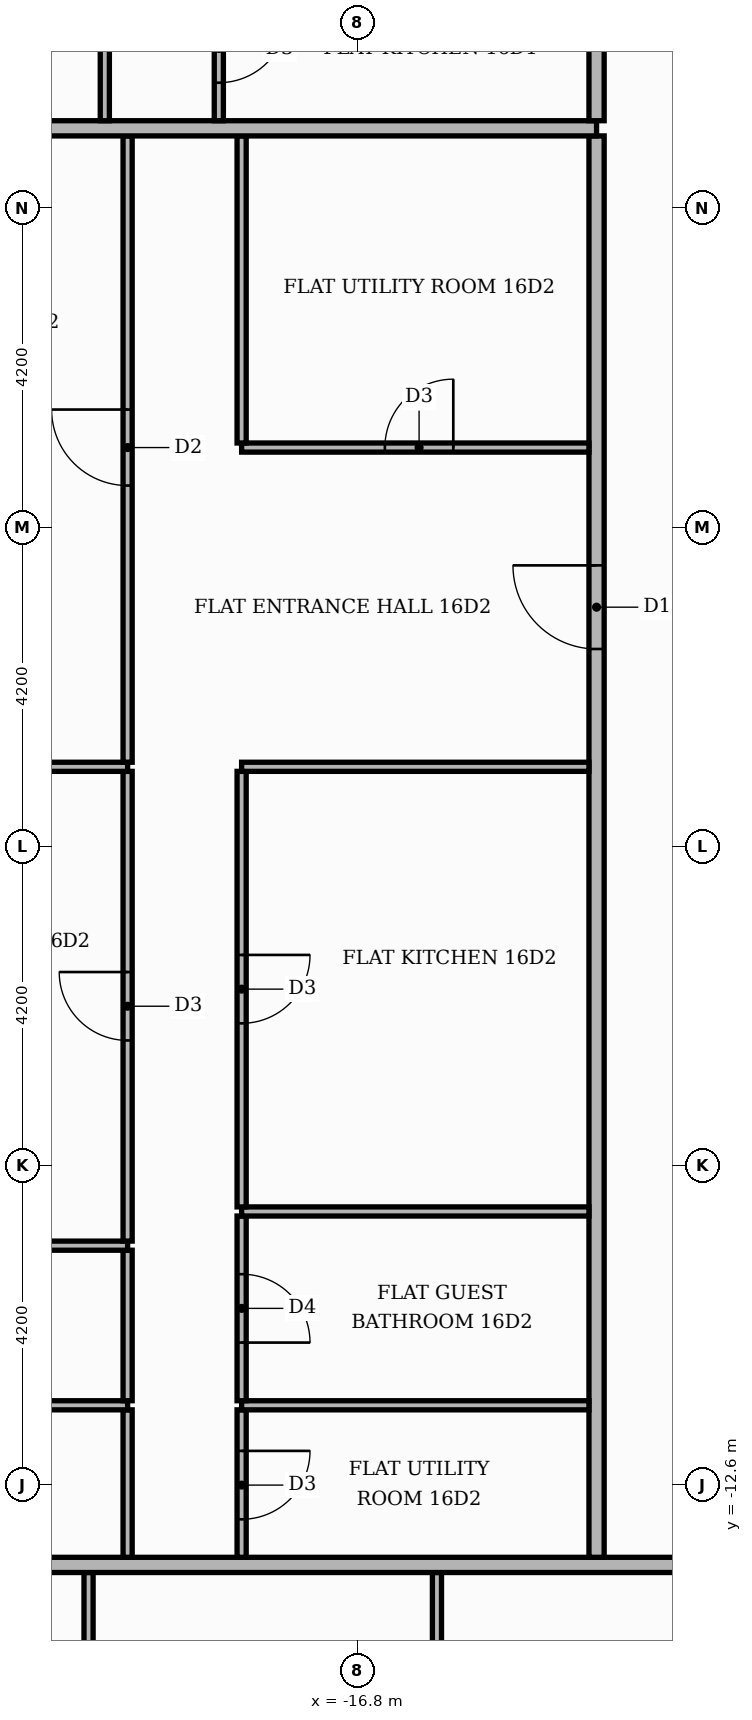
"""IFC4 building model, lengths in metres.
Left out: names, types, materials, properties, quantities, classifications, styles, units other than length and angle.
Written with IfcOpenShell. Run it as: python <this file> out.ifc"""

import sys

from ifc_helpers import new_model, si_unit, direction, frame, frame_2d, origin, place, context, subcontext, project, spatial, rectangle, extrude, element, fill, save


model = new_model("IFC4")
c1 = context("Model", 3, precision=1e-05, world=origin(), true_north=direction((0.0, 1.0)))
c2 = subcontext(c1, "Body", "Model", "MODEL_VIEW")
j1 = project(units=[si_unit("LENGTHUNIT", "METRE"), si_unit("PLANEANGLEUNIT", "RADIAN")], contexts=[c1])
p1 = place(None, origin())
s1 = spatial("IfcSite", under=j1, at=p1, CompositionType="ELEMENT")
p2 = place(p1, origin())
s2 = spatial("IfcBuilding", under=s1, at=p2, CompositionType="ELEMENT")
p3 = place(p2, frame((0.0, 0.0, 69.9)))
s3 = spatial("IfcBuildingStorey", under=s2, at=p3, CompositionType="ELEMENT", Elevation=69.9)
p4 = place(p3, frame((-20.334, -20.66, 0.0), z_axis=(0.0, 0.0, 1.0), x_axis=(0.0, 1.0, 0.0)))
e1 = element("IfcWall", 1, at=p4, inside=s3, PredefinedType="PARTITIONING", context=c2, shape_type="SweptSolid", body=[
    extrude(rectangle(XDim=6.91, YDim=0.12, at=frame_2d((3.455, 0.0))), origin(), (0.0, 0.0, 1.0), 3.4),
])
p5 = place(p4, frame((4.792, 0.0, 0.0)))
e2 = element("IfcOpeningElement", 2, at=p5, cuts=e1, PredefinedType="OPENING", context=c2, shape_type="SweptSolid", body=[
    extrude(rectangle(XDim=0.9, YDim=2.1, at=frame_2d((0.45, 1.05))), frame((0.0, 0.07, 0.0), z_axis=(0.0, -1.0, 0.0), x_axis=(1.0, 0.0, 0.0)), (0.0, 0.0, 1.0), 0.14),
])
p6 = place(p3, frame((-15.75, -20.66, 0.0), z_axis=(0.0, 0.0, 1.0), x_axis=(0.0, 1.0, 0.0)))
e3 = element("IfcWall", 3, at=p6, inside=s3, PredefinedType="PARTITIONING", context=c2, shape_type="SweptSolid", body=[
    extrude(rectangle(XDim=6.91, YDim=0.12, at=frame_2d((3.455, 0.0))), origin(), (0.0, 0.0, 1.0), 3.4),
])
p7 = place(p6, frame((2.975, 0.0, 0.0)))
e4 = element("IfcOpeningElement", 4, at=p7, cuts=e3, PredefinedType="OPENING", context=c2, shape_type="SweptSolid", body=[
    extrude(rectangle(XDim=1.0, YDim=2.1, at=frame_2d((0.5, 1.05))), frame((0.0, 0.07, 0.0), z_axis=(0.0, -1.0, 0.0), x_axis=(1.0, 0.0, 0.0)), (0.0, 0.0, 1.0), 0.14),
])
p8 = place(p3, frame((-25.42, -13.65, 0.0), z_axis=(0.0, 0.0, 1.0), x_axis=(1.0, 0.0, 0.0)))
e5 = element("IfcWall", 5, at=p8, inside=s3, PredefinedType="PARTITIONING", context=c2, shape_type="SweptSolid", body=[
    extrude(rectangle(XDim=39.07, YDim=0.2, at=frame_2d((19.535, 0.0))), origin(), (0.0, 0.0, 1.0), 3.4),
])
p9 = place(p8, frame((13.32, 0.0, 0.0)))
e6 = element("IfcOpeningElement", 6, at=p9, cuts=e5, PredefinedType="OPENING", context=c2, shape_type="SweptSolid", body=[
    extrude(rectangle(XDim=1.1, YDim=2.4, at=frame_2d((0.55, 1.2))), frame((0.0, 0.11, 0.0), z_axis=(0.0, -1.0, 0.0), x_axis=(1.0, 0.0, 0.0)), (0.0, 0.0, 1.0), 0.22),
])
p10 = place(p8, frame((21.72, 0.0, 0.0)))
e7 = element("IfcOpeningElement", 7, at=p10, cuts=e5, PredefinedType="OPENING", context=c2, shape_type="SweptSolid", body=[
    extrude(rectangle(XDim=1.1, YDim=2.4, at=frame_2d((0.55, 1.2))), frame((0.0, 0.11, 0.0), z_axis=(0.0, -1.0, 0.0), x_axis=(1.0, 0.0, 0.0)), (0.0, 0.0, 1.0), 0.22),
])
p11 = place(p3, frame((-19.82, -13.55, 0.0), z_axis=(0.0, 0.0, 1.0), x_axis=(0.0, 1.0, 0.0)))
e8 = element("IfcWall", 8, at=p11, inside=s3, PredefinedType="PARTITIONING", context=c2, shape_type="SweptSolid", body=[
    extrude(rectangle(XDim=1.94, YDim=0.12, at=frame_2d((0.97, 0.0))), origin(), (0.0, 0.0, 1.0), 3.4),
])
p12 = place(p3, frame((-18.32, -13.55, 0.0), z_axis=(0.0, 0.0, 1.0), x_axis=(0.0, 1.0, 0.0)))
e9 = element("IfcWall", 9, at=p12, inside=s3, PredefinedType="PARTITIONING", context=c2, shape_type="SweptSolid", body=[
    extrude(rectangle(XDim=1.94, YDim=0.12, at=frame_2d((0.97, 0.0))), origin(), (0.0, 0.0, 1.0), 3.4),
])
p13 = place(p12, frame((0.5, 0.0, 0.0)))
e10 = element("IfcOpeningElement", 10, at=p13, cuts=e9, PredefinedType="OPENING", context=c2, shape_type="SweptSolid", body=[
    extrude(rectangle(XDim=0.9, YDim=2.1, at=frame_2d((0.45, 1.05))), frame((0.0, 0.07, 0.0), z_axis=(0.0, -1.0, 0.0), x_axis=(1.0, 0.0, 0.0)), (0.0, 0.0, 1.0), 0.14),
])
p14 = place(p3, frame((-13.65, -13.55, 0.0), z_axis=(0.0, 0.0, 1.0), x_axis=(0.0, 1.0, 0.0)))
e11 = element("IfcWall", 11, at=p14, inside=s3, PredefinedType="PARTITIONING", context=c2, shape_type="SweptSolid", body=[
    extrude(rectangle(XDim=18.7, YDim=0.2, at=frame_2d((9.35, 0.0))), origin(), (0.0, 0.0, 1.0), 3.4),
])
p15 = place(p14, frame((11.95, 0.0, 0.0)))
e12 = element("IfcOpeningElement", 12, at=p15, cuts=e11, PredefinedType="OPENING", context=c2, shape_type="SweptSolid", body=[
    extrude(rectangle(XDim=1.1, YDim=2.4, at=frame_2d((0.55, 1.2))), frame((0.0, 0.11, 0.0), z_axis=(0.0, -1.0, 0.0), x_axis=(1.0, 0.0, 0.0)), (0.0, 0.0, 1.0), 0.22),
])
p16 = place(p3, frame((-25.42, -11.55, 0.0), z_axis=(0.0, 0.0, 1.0), x_axis=(1.0, 0.0, 0.0)))
e13 = element("IfcWall", 13, at=p16, inside=s3, PredefinedType="PARTITIONING", context=c2, shape_type="SweptSolid", body=[
    extrude(rectangle(XDim=5.6, YDim=0.12, at=frame_2d((2.8, 0.0))), origin(), (0.0, 0.0, 1.0), 3.4),
])
p17 = place(p16, frame((2.2, 0.0, 0.0)))
e14 = element("IfcOpeningElement", 14, at=p17, cuts=e13, PredefinedType="OPENING", context=c2, shape_type="SweptSolid", body=[
    extrude(rectangle(XDim=0.9, YDim=2.1, at=frame_2d((0.45, 1.05))), frame((0.0, 0.07, 0.0), z_axis=(0.0, -1.0, 0.0), x_axis=(1.0, 0.0, 0.0)), (0.0, 0.0, 1.0), 0.14),
])
p18 = place(p3, frame((-18.32, -11.55, 0.0), z_axis=(0.0, 0.0, 1.0), x_axis=(1.0, 0.0, 0.0)))
e15 = element("IfcWall", 15, at=p18, inside=s3, PredefinedType="PARTITIONING", context=c2, shape_type="SweptSolid", body=[
    extrude(rectangle(XDim=4.57, YDim=0.12, at=frame_2d((2.285, 0.0))), origin(), (0.0, 0.0, 1.0), 3.4),
])
p19 = place(p3, frame((-19.82, -11.49, 0.0), z_axis=(0.0, 0.0, 1.0), x_axis=(0.0, 1.0, 0.0)))
e16 = element("IfcWall", 16, at=p19, inside=s3, PredefinedType="PARTITIONING", context=c2, shape_type="SweptSolid", body=[
    extrude(rectangle(XDim=1.98, YDim=0.12, at=frame_2d((0.99, 0.0))), origin(), (0.0, 0.0, 1.0), 3.4),
])
p20 = place(p3, frame((-18.32, -11.49, 0.0), z_axis=(0.0, 0.0, 1.0), x_axis=(0.0, 1.0, 0.0)))
e17 = element("IfcWall", 17, at=p20, inside=s3, PredefinedType="PARTITIONING", context=c2, shape_type="SweptSolid", body=[
    extrude(rectangle(XDim=2.43, YDim=0.12, at=frame_2d((1.215, 0.0))), origin(), (0.0, 0.0, 1.0), 3.4),
])
p21 = place(p20, frame((0.765, 0.0, 0.0)))
e18 = element("IfcOpeningElement", 18, at=p21, cuts=e17, PredefinedType="OPENING", context=c2, shape_type="SweptSolid", body=[
    extrude(rectangle(XDim=0.9, YDim=2.1, at=frame_2d((0.45, 1.05))), frame((0.0, 0.07, 0.0), z_axis=(0.0, -1.0, 0.0), x_axis=(1.0, 0.0, 0.0)), (0.0, 0.0, 1.0), 0.14),
])
p22 = place(p3, frame((-25.42, -9.45, 0.0), z_axis=(0.0, 0.0, 1.0), x_axis=(1.0, 0.0, 0.0)))
e19 = element("IfcWall", 19, at=p22, inside=s3, PredefinedType="PARTITIONING", context=c2, shape_type="SweptSolid", body=[
    extrude(rectangle(XDim=5.6, YDim=0.12, at=frame_2d((2.8, 0.0))), origin(), (0.0, 0.0, 1.0), 3.4),
])
p23 = place(p22, frame((2.2, 0.0, 0.0)))
e20 = element("IfcOpeningElement", 20, at=p23, cuts=e19, PredefinedType="OPENING", context=c2, shape_type="SweptSolid", body=[
    extrude(rectangle(XDim=0.9, YDim=2.1, at=frame_2d((0.45, 1.05))), frame((0.0, 0.07, 0.0), z_axis=(0.0, -1.0, 0.0), x_axis=(1.0, 0.0, 0.0)), (0.0, 0.0, 1.0), 0.14),
])
p24 = place(p3, frame((-19.82, -9.39, 0.0), z_axis=(0.0, 0.0, 1.0), x_axis=(0.0, 1.0, 0.0)))
e21 = element("IfcWall", 21, at=p24, inside=s3, PredefinedType="PARTITIONING", context=c2, shape_type="SweptSolid", body=[
    extrude(rectangle(XDim=6.18, YDim=0.12, at=frame_2d((3.09, 0.0))), origin(), (0.0, 0.0, 1.0), 3.4),
])
p25 = place(p24, frame((2.64, 0.0, 0.0)))
e22 = element("IfcOpeningElement", 22, at=p25, cuts=e21, PredefinedType="OPENING", context=c2, shape_type="SweptSolid", body=[
    extrude(rectangle(XDim=0.9, YDim=2.1, at=frame_2d((0.45, 1.05))), frame((0.0, 0.07, 0.0), z_axis=(0.0, -1.0, 0.0), x_axis=(1.0, 0.0, 0.0)), (0.0, 0.0, 1.0), 0.14),
])
p26 = place(p3, frame((-18.32, -9.0, 0.0), z_axis=(0.0, 0.0, 1.0), x_axis=(1.0, 0.0, 0.0)))
e23 = element("IfcWall", 23, at=p26, inside=s3, PredefinedType="PARTITIONING", context=c2, shape_type="SweptSolid", body=[
    extrude(rectangle(XDim=4.57, YDim=0.12, at=frame_2d((2.285, 0.0))), origin(), (0.0, 0.0, 1.0), 3.4),
])
p27 = place(p3, frame((-18.32, -8.94, 0.0), z_axis=(0.0, 0.0, 1.0), x_axis=(0.0, 1.0, 0.0)))
e24 = element("IfcWall", 24, at=p27, inside=s3, PredefinedType="PARTITIONING", context=c2, shape_type="SweptSolid", body=[
    extrude(rectangle(XDim=5.73, YDim=0.12, at=frame_2d((2.865, 0.0))), origin(), (0.0, 0.0, 1.0), 3.4),
])
p28 = place(p27, frame((2.415, 0.0, 0.0)))
e25 = element("IfcOpeningElement", 25, at=p28, cuts=e24, PredefinedType="OPENING", context=c2, shape_type="SweptSolid", body=[
    extrude(rectangle(XDim=0.9, YDim=2.1, at=frame_2d((0.45, 1.05))), frame((0.0, 0.07, 0.0), z_axis=(0.0, -1.0, 0.0), x_axis=(1.0, 0.0, 0.0)), (0.0, 0.0, 1.0), 0.14),
])
p29 = place(p3, frame((-25.42, -3.15, 0.0), z_axis=(0.0, 0.0, 1.0), x_axis=(1.0, 0.0, 0.0)))
e26 = element("IfcWall", 26, at=p29, inside=s3, PredefinedType="PARTITIONING", context=c2, shape_type="SweptSolid", body=[
    extrude(rectangle(XDim=5.6, YDim=0.12, at=frame_2d((2.8, 0.0))), origin(), (0.0, 0.0, 1.0), 3.4),
])
p30 = place(p3, frame((-18.32, -3.15, 0.0), z_axis=(0.0, 0.0, 1.0), x_axis=(1.0, 0.0, 0.0)))
e27 = element("IfcWall", 27, at=p30, inside=s3, PredefinedType="PARTITIONING", context=c2, shape_type="SweptSolid", body=[
    extrude(rectangle(XDim=4.57, YDim=0.12, at=frame_2d((2.285, 0.0))), origin(), (0.0, 0.0, 1.0), 3.4),
])
p31 = place(p3, frame((-19.82, -3.09, 0.0), z_axis=(0.0, 0.0, 1.0), x_axis=(0.0, 1.0, 0.0)))
e28 = element("IfcWall", 28, at=p31, inside=s3, PredefinedType="PARTITIONING", context=c2, shape_type="SweptSolid", body=[
    extrude(rectangle(XDim=8.24, YDim=0.12, at=frame_2d((4.12, 0.0))), origin(), (0.0, 0.0, 1.0), 3.4),
])
p32 = place(p31, frame((3.64, 0.0, 0.0)))
e29 = element("IfcOpeningElement", 29, at=p32, cuts=e28, PredefinedType="OPENING", context=c2, shape_type="SweptSolid", body=[
    extrude(rectangle(XDim=1.0, YDim=2.1, at=frame_2d((0.5, 1.05))), frame((0.0, 0.07, 0.0), z_axis=(0.0, -1.0, 0.0), x_axis=(1.0, 0.0, 0.0)), (0.0, 0.0, 1.0), 0.14),
])
p33 = place(p3, frame((-18.32, 1.05, 0.0), z_axis=(0.0, 0.0, 1.0), x_axis=(1.0, 0.0, 0.0)))
e30 = element("IfcWall", 30, at=p33, inside=s3, PredefinedType="PARTITIONING", context=c2, shape_type="SweptSolid", body=[
    extrude(rectangle(XDim=4.57, YDim=0.12, at=frame_2d((2.285, 0.0))), origin(), (0.0, 0.0, 1.0), 3.4),
])
p34 = place(p33, frame((1.885, 0.0, 0.0)))
e31 = element("IfcOpeningElement", 31, at=p34, cuts=e30, PredefinedType="OPENING", context=c2, shape_type="SweptSolid", body=[
    extrude(rectangle(XDim=0.9, YDim=2.1, at=frame_2d((0.45, 1.05))), frame((0.0, 0.07, 0.0), z_axis=(0.0, -1.0, 0.0), x_axis=(1.0, 0.0, 0.0)), (0.0, 0.0, 1.0), 0.14),
])
p35 = place(p3, frame((-18.32, 1.11, 0.0), z_axis=(0.0, 0.0, 1.0), x_axis=(0.0, 1.0, 0.0)))
e32 = element("IfcWall", 32, at=p35, inside=s3, PredefinedType="PARTITIONING", context=c2, shape_type="SweptSolid", body=[
    extrude(rectangle(XDim=4.04, YDim=0.12, at=frame_2d((2.02, 0.0))), origin(), (0.0, 0.0, 1.0), 3.4),
])
p36 = place(p3, frame((-25.42, 5.25, 0.0), z_axis=(0.0, 0.0, 1.0), x_axis=(1.0, 0.0, 0.0)))
e33 = element("IfcWall", 33, at=p36, inside=s3, PredefinedType="PARTITIONING", context=c2, shape_type="SweptSolid", body=[
    extrude(rectangle(XDim=11.77, YDim=0.2, at=frame_2d((5.885, 0.0))), origin(), (0.0, 0.0, 1.0), 3.4),
])
p37 = place(p3, frame((-20.12, 5.35, 0.0), z_axis=(0.0, 0.0, 1.0), x_axis=(0.0, 1.0, 0.0)))
e34 = element("IfcWall", 34, at=p37, inside=s3, PredefinedType="PARTITIONING", context=c2, shape_type="SweptSolid", body=[
    extrude(rectangle(XDim=1.94, YDim=0.12, at=frame_2d((0.97, 0.0))), origin(), (0.0, 0.0, 1.0), 3.4),
])
p38 = place(p3, frame((-18.62, 5.35, 0.0), z_axis=(0.0, 0.0, 1.0), x_axis=(0.0, 1.0, 0.0)))
e35 = element("IfcWall", 35, at=p38, inside=s3, PredefinedType="PARTITIONING", context=c2, shape_type="SweptSolid", body=[
    extrude(rectangle(XDim=1.94, YDim=0.12, at=frame_2d((0.97, 0.0))), origin(), (0.0, 0.0, 1.0), 3.4),
])
p39 = place(p38, frame((0.5, 0.0, 0.0)))
e36 = element("IfcOpeningElement", 36, at=p39, cuts=e35, PredefinedType="OPENING", context=c2, shape_type="SweptSolid", body=[
    extrude(rectangle(XDim=0.9, YDim=2.1, at=frame_2d((0.45, 1.05))), frame((0.0, 0.07, 0.0), z_axis=(0.0, -1.0, 0.0), x_axis=(1.0, 0.0, 0.0)), (0.0, 0.0, 1.0), 0.14),
])
p40 = place(p3, frame((-13.65, 5.35, 0.0), z_axis=(0.0, 0.0, 1.0), x_axis=(0.0, 1.0, 0.0)))
e37 = element("IfcWall", 37, at=p40, inside=s3, PredefinedType="PARTITIONING", context=c2, shape_type="SweptSolid", body=[
    extrude(rectangle(XDim=8.2, YDim=0.2, at=frame_2d((4.1, 0.0))), origin(), (0.0, 0.0, 1.0), 3.4),
])
p41 = place(p40, frame((5.65, 0.0, 0.0)))
e38 = element("IfcOpeningElement", 38, at=p41, cuts=e37, PredefinedType="OPENING", context=c2, shape_type="SweptSolid", body=[
    extrude(rectangle(XDim=1.1, YDim=2.4, at=frame_2d((0.55, 1.2))), frame((0.0, 0.11, 0.0), z_axis=(0.0, -1.0, 0.0), x_axis=(1.0, 0.0, 0.0)), (0.0, 0.0, 1.0), 0.22),
])
p42 = place(p39, frame((0.9, 0.0, 0.0), z_axis=(0.0, 0.0, 1.0), x_axis=(-1.0, 0.0, 0.0)))
e39 = element("IfcDoor", 39, at=p42, inside=s3, OperationType="SINGLE_SWING_RIGHT", PredefinedType="DOOR", context=c2, shape_type="SweptSolid", body=[
    extrude(rectangle(XDim=0.9, YDim=2.1, at=frame_2d((0.45, 1.05))), frame((0.0, 0.025, 0.0), z_axis=(0.0, -1.0, 0.0), x_axis=(1.0, 0.0, 0.0)), (0.0, 0.0, 1.0), 0.05),
])
fill(e36, e39)
p43 = place(p15, origin())
e40 = element("IfcDoor", 40, at=p43, inside=s3, OperationType="SINGLE_SWING_RIGHT", PredefinedType="DOOR", context=c2, shape_type="SweptSolid", body=[
    extrude(rectangle(XDim=1.1, YDim=2.4, at=frame_2d((0.55, 1.2))), frame((0.0, 0.025, 0.0), z_axis=(0.0, -1.0, 0.0), x_axis=(1.0, 0.0, 0.0)), (0.0, 0.0, 1.0), 0.05),
])
fill(e12, e40)
p44 = place(p34, origin())
e41 = element("IfcDoor", 41, at=p44, inside=s3, OperationType="SINGLE_SWING_RIGHT", PredefinedType="DOOR", context=c2, shape_type="SweptSolid", body=[
    extrude(rectangle(XDim=0.9, YDim=2.1, at=frame_2d((0.45, 1.05))), frame((0.0, 0.025, 0.0), z_axis=(0.0, -1.0, 0.0), x_axis=(1.0, 0.0, 0.0)), (0.0, 0.0, 1.0), 0.05),
])
fill(e31, e41)
p45 = place(p28, frame((0.9, 0.0, 0.0), z_axis=(0.0, 0.0, 1.0), x_axis=(-1.0, 0.0, 0.0)))
e42 = element("IfcDoor", 42, at=p45, inside=s3, OperationType="SINGLE_SWING_RIGHT", PredefinedType="DOOR", context=c2, shape_type="SweptSolid", body=[
    extrude(rectangle(XDim=0.9, YDim=2.1, at=frame_2d((0.45, 1.05))), frame((0.0, 0.025, 0.0), z_axis=(0.0, -1.0, 0.0), x_axis=(1.0, 0.0, 0.0)), (0.0, 0.0, 1.0), 0.05),
])
fill(e25, e42)
p46 = place(p21, frame((0.9, 0.0, 0.0), z_axis=(0.0, 0.0, 1.0), x_axis=(-1.0, 0.0, 0.0)))
e43 = element("IfcDoor", 43, at=p46, inside=s3, OperationType="SINGLE_SWING_LEFT", PredefinedType="DOOR", context=c2, shape_type="SweptSolid", body=[
    extrude(rectangle(XDim=0.9, YDim=2.1, at=frame_2d((0.45, 1.05))), frame((0.0, 0.025, 0.0), z_axis=(0.0, -1.0, 0.0), x_axis=(1.0, 0.0, 0.0)), (0.0, 0.0, 1.0), 0.05),
])
fill(e18, e43)
p47 = place(p13, frame((0.9, 0.0, 0.0), z_axis=(0.0, 0.0, 1.0), x_axis=(-1.0, 0.0, 0.0)))
e44 = element("IfcDoor", 44, at=p47, inside=s3, OperationType="SINGLE_SWING_RIGHT", PredefinedType="DOOR", context=c2, shape_type="SweptSolid", body=[
    extrude(rectangle(XDim=0.9, YDim=2.1, at=frame_2d((0.45, 1.05))), frame((0.0, 0.025, 0.0), z_axis=(0.0, -1.0, 0.0), x_axis=(1.0, 0.0, 0.0)), (0.0, 0.0, 1.0), 0.05),
])
fill(e10, e44)
p48 = place(p32, origin())
e45 = element("IfcDoor", 45, at=p48, inside=s3, OperationType="SINGLE_SWING_RIGHT", PredefinedType="DOOR", context=c2, shape_type="SweptSolid", body=[
    extrude(rectangle(XDim=1.0, YDim=2.1, at=frame_2d((0.5, 1.05))), frame((0.0, 0.025, 0.0), z_axis=(0.0, -1.0, 0.0), x_axis=(1.0, 0.0, 0.0)), (0.0, 0.0, 1.0), 0.05),
])
fill(e29, e45)
p49 = place(p25, origin())
e46 = element("IfcDoor", 46, at=p49, inside=s3, OperationType="SINGLE_SWING_RIGHT", PredefinedType="DOOR", context=c2, shape_type="SweptSolid", body=[
    extrude(rectangle(XDim=0.9, YDim=2.1, at=frame_2d((0.45, 1.05))), frame((0.0, 0.025, 0.0), z_axis=(0.0, -1.0, 0.0), x_axis=(1.0, 0.0, 0.0)), (0.0, 0.0, 1.0), 0.05),
])
fill(e22, e46)
save(model, sys.argv[1])
